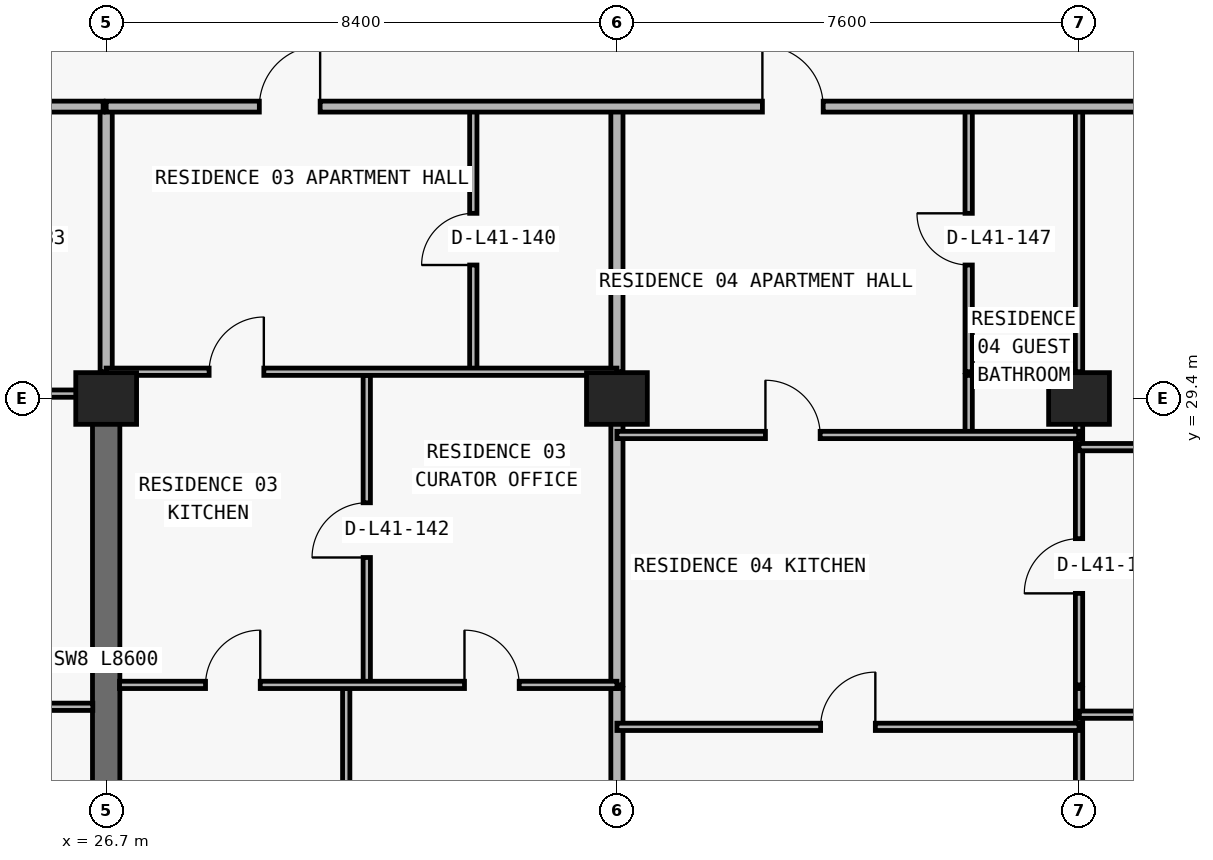
"""IFC4 building model, lengths in metres.
Left out: names, types, materials, properties, quantities, classifications, styles, units other than length and angle.
Written with IfcOpenShell. Run it as: python <this file> out.ifc"""

import sys

from ifc_helpers import new_model, si_unit, direction, frame, frame_2d, origin, origin_2d, place, context, subcontext, project, spatial, rectangle, extrude, element, fill, save


model = new_model("IFC4")
c1 = context("Model", 3, precision=1e-05, world=origin(), true_north=direction((0.0, 1.0)))
c2 = subcontext(c1, "Body", "Model", "MODEL_VIEW")
j1 = project(units=[si_unit("LENGTHUNIT", "METRE"), si_unit("PLANEANGLEUNIT", "RADIAN")], contexts=[c1])
p1 = place(None, origin())
s1 = spatial("IfcSite", under=j1, at=p1, CompositionType="ELEMENT")
p2 = place(p1, origin())
s2 = spatial("IfcBuilding", under=s1, at=p2, CompositionType="ELEMENT")
p3 = place(p2, frame((0.0, 0.0, 148.8)))
s3 = spatial("IfcBuildingStorey", under=s2, at=p3, CompositionType="ELEMENT", Elevation=148.8)
for number, where, z_axis, x_axis in (
    (1, (26.7, 29.4, 0.0), (0.0, 0.0, 1.0), (1.0, 0.0, 0.0)),
    (2, (35.1, 29.4, 0.0), (0.0, 0.0, 1.0), (1.0, 0.0, 0.0)),
    (3, (42.7, 29.4, 0.0), (0.0, 0.0, 1.0), (1.0, 0.0, 0.0)),
):
    element("IfcColumn", number, at=place(p3, frame(where, z_axis=z_axis, x_axis=x_axis)), inside=s3, PredefinedType="COLUMN", context=c2, shape_type="SweptSolid", body=[
        extrude(rectangle(XDim=1.0, YDim=0.85, at=origin_2d()), origin(), (0.0, 0.0, 1.0), 3.0),
    ])
p4 = place(p3, frame((26.7, 20.8, 0.0), z_axis=(0.0, 0.0, 1.0), x_axis=(0.0, 1.0, 0.0)))
e4 = element("IfcWall", 4, at=p4, inside=s3, PredefinedType="SHEAR", context=c2, shape_type="SweptSolid", body=[
    extrude(rectangle(XDim=8.6, YDim=0.45, at=frame_2d((4.3, 0.0))), origin(), (0.0, 0.0, 1.0), 3.0),
])
p5 = place(p3, frame((26.7, 29.405, 0.0), z_axis=(0.0, 0.0, 1.0), x_axis=(0.0, 1.0, 0.0)))
e5 = element("IfcWall", 5, at=p5, inside=s3, PredefinedType="PARTITIONING", context=c2, shape_type="SweptSolid", body=[
    extrude(rectangle(XDim=0.375, YDim=0.2, at=frame_2d((0.188, 0.0))), origin(), (0.0, 0.0, 1.0), 3.0),
])
p6 = place(p3, frame((26.7, 29.84, 0.0), z_axis=(0.0, 0.0, 1.0), x_axis=(0.0, 1.0, 0.0)))
e6 = element("IfcWall", 6, at=p6, inside=s3, PredefinedType="PARTITIONING", context=c2, shape_type="SweptSolid", body=[
    extrude(rectangle(XDim=4.36, YDim=0.2, at=frame_2d((2.18, 0.0))), origin(), (0.0, 0.0, 1.0), 2.285),
])
p7 = place(p3, frame((30.648, 8.84, 0.0), z_axis=(0.0, 0.0, 1.0), x_axis=(0.0, 1.0, 0.0)))
e7 = element("IfcWall", 7, at=p7, inside=s3, PredefinedType="PARTITIONING", context=c2, shape_type="SweptSolid", body=[
    extrude(rectangle(XDim=15.79, YDim=0.12, at=frame_2d((7.895, 0.0))), origin(), (0.0, 0.0, 1.0), 3.0),
])
p8 = place(p3, frame((30.986, 24.69, 0.0), z_axis=(0.0, 0.0, 1.0), x_axis=(0.0, 1.0, 0.0)))
e8 = element("IfcWall", 8, at=p8, inside=s3, PredefinedType="PARTITIONING", context=c2, shape_type="SweptSolid", body=[
    extrude(rectangle(XDim=5.09, YDim=0.12, at=frame_2d((2.545, 0.0))), origin(), (0.0, 0.0, 1.0), 2.436),
])
p9 = place(p8, frame((2.095, 0.0, 0.0)))
e9 = element("IfcOpeningElement", 9, at=p9, cuts=e8, PredefinedType="OPENING", context=c2, shape_type="SweptSolid", body=[
    extrude(rectangle(XDim=0.9, YDim=2.15, at=frame_2d((0.45, 1.075))), frame((0.0, 0.07, 0.0), z_axis=(0.0, -1.0, 0.0), x_axis=(1.0, 0.0, 0.0)), (0.0, 0.0, 1.0), 0.14),
])
p10 = place(p3, frame((32.738, 29.84, 0.0), z_axis=(0.0, 0.0, 1.0), x_axis=(0.0, 1.0, 0.0)))
e10 = element("IfcWall", 10, at=p10, inside=s3, PredefinedType="PARTITIONING", context=c2, shape_type="SweptSolid", body=[
    extrude(rectangle(XDim=4.36, YDim=0.12, at=frame_2d((2.18, 0.0))), origin(), (0.0, 0.0, 1.0), 3.0),
])
p11 = place(p10, frame((1.755, 0.0, 0.0)))
e11 = element("IfcOpeningElement", 11, at=p11, cuts=e10, PredefinedType="OPENING", context=c2, shape_type="SweptSolid", body=[
    extrude(rectangle(XDim=0.85, YDim=2.1, at=frame_2d((0.425, 1.05))), frame((0.0, 0.07, 0.0), z_axis=(0.0, -1.0, 0.0), x_axis=(1.0, 0.0, 0.0)), (0.0, 0.0, 1.0), 0.14),
])
p12 = place(p3, frame((35.1, 8.84, 0.0), z_axis=(0.0, 0.0, 1.0), x_axis=(0.0, 1.0, 0.0)))
e12 = element("IfcWall", 12, at=p12, inside=s3, PredefinedType="PARTITIONING", context=c2, shape_type="SweptSolid", body=[
    extrude(rectangle(XDim=15.79, YDim=0.2, at=frame_2d((7.895, 0.0))), origin(), (0.0, 0.0, 1.0), 2.124),
])
p13 = place(p3, frame((35.1, 24.69, 0.0), z_axis=(0.0, 0.0, 1.0), x_axis=(0.0, 1.0, 0.0)))
e13 = element("IfcWall", 13, at=p13, inside=s3, PredefinedType="PARTITIONING", context=c2, shape_type="SweptSolid", body=[
    extrude(rectangle(XDim=5.09, YDim=0.2, at=frame_2d((2.545, 0.0))), origin(), (0.0, 0.0, 1.0), 2.124),
])
p14 = place(p3, frame((35.1, 29.84, 0.0), z_axis=(0.0, 0.0, 1.0), x_axis=(0.0, 1.0, 0.0)))
e14 = element("IfcWall", 14, at=p14, inside=s3, PredefinedType="PARTITIONING", context=c2, shape_type="SweptSolid", body=[
    extrude(rectangle(XDim=4.36, YDim=0.2, at=frame_2d((2.18, 0.0))), origin(), (0.0, 0.0, 1.0), 2.124),
])
p15 = place(p3, frame((40.885, 28.8, 0.0), z_axis=(0.0, 0.0, 1.0), x_axis=(0.0, 1.0, 0.0)))
e15 = element("IfcWall", 15, at=p15, inside=s3, PredefinedType="PARTITIONING", context=c2, shape_type="SweptSolid", body=[
    extrude(rectangle(XDim=0.98, YDim=0.12, at=frame_2d((0.49, 0.0))), origin(), (0.0, 0.0, 1.0), 2.629),
])
p16 = place(p3, frame((40.885, 29.84, 0.0), z_axis=(0.0, 0.0, 1.0), x_axis=(0.0, 1.0, 0.0)))
e16 = element("IfcWall", 16, at=p16, inside=s3, PredefinedType="PARTITIONING", context=c2, shape_type="SweptSolid", body=[
    extrude(rectangle(XDim=4.36, YDim=0.12, at=frame_2d((2.18, 0.0))), origin(), (0.0, 0.0, 1.0), 3.0),
])
p17 = place(p16, frame((1.755, 0.0, 0.0)))
e17 = element("IfcOpeningElement", 17, at=p17, cuts=e16, PredefinedType="OPENING", context=c2, shape_type="SweptSolid", body=[
    extrude(rectangle(XDim=0.85, YDim=2.1, at=frame_2d((0.425, 1.05))), frame((0.0, 0.07, 0.0), z_axis=(0.0, -1.0, 0.0), x_axis=(1.0, 0.0, 0.0)), (0.0, 0.0, 1.0), 0.14),
])
p18 = place(p3, frame((42.7, 8.84, 0.0), z_axis=(0.0, 0.0, 1.0), x_axis=(0.0, 1.0, 0.0)))
e18 = element("IfcWall", 18, at=p18, inside=s3, PredefinedType="PARTITIONING", context=c2, shape_type="SweptSolid", body=[
    extrude(rectangle(XDim=15.79, YDim=0.12, at=frame_2d((7.895, 0.0))), origin(), (0.0, 0.0, 1.0), 2.124),
])
p19 = place(p3, frame((42.7, 24.69, 0.0), z_axis=(0.0, 0.0, 1.0), x_axis=(0.0, 1.0, 0.0)))
e19 = element("IfcWall", 19, at=p19, inside=s3, PredefinedType="PARTITIONING", context=c2, shape_type="SweptSolid", body=[
    extrude(rectangle(XDim=5.09, YDim=0.12, at=frame_2d((2.545, 0.0))), origin(), (0.0, 0.0, 1.0), 2.124),
])
p20 = place(p19, frame((1.505, 0.0, 0.0)))
e20 = element("IfcOpeningElement", 20, at=p20, cuts=e19, PredefinedType="OPENING", context=c2, shape_type="SweptSolid", body=[
    extrude(rectangle(XDim=0.9, YDim=2.074, at=frame_2d((0.45, 1.037))), frame((0.0, 0.07, 0.0), z_axis=(0.0, -1.0, 0.0), x_axis=(1.0, 0.0, 0.0)), (0.0, 0.0, 1.0), 0.14),
])
p21 = place(p3, frame((42.7, 29.84, 0.0), z_axis=(0.0, 0.0, 1.0), x_axis=(0.0, 1.0, 0.0)))
e21 = element("IfcWall", 21, at=p21, inside=s3, PredefinedType="PARTITIONING", context=c2, shape_type="SweptSolid", body=[
    extrude(rectangle(XDim=4.36, YDim=0.12, at=frame_2d((2.18, 0.0))), origin(), (0.0, 0.0, 1.0), 2.124),
])
p22 = place(p3, frame((35.1, 24.0, 0.0), z_axis=(0.0, 0.0, 1.0), x_axis=(1.0, 0.0, 0.0)))
e22 = element("IfcWall", 22, at=p22, inside=s3, PredefinedType="PARTITIONING", context=c2, shape_type="SweptSolid", body=[
    extrude(rectangle(XDim=7.6, YDim=0.12, at=frame_2d((3.8, 0.0))), origin(), (0.0, 0.0, 1.0), 3.0),
])
p23 = place(p22, frame((3.35, 0.0, 0.0)))
e23 = element("IfcOpeningElement", 23, at=p23, cuts=e22, PredefinedType="OPENING", context=c2, shape_type="SweptSolid", body=[
    extrude(rectangle(XDim=0.9, YDim=2.15, at=frame_2d((0.45, 1.075))), frame((0.0, 0.07, 0.0), z_axis=(0.0, -1.0, 0.0), x_axis=(1.0, 0.0, 0.0)), (0.0, 0.0, 1.0), 0.14),
])
p24 = place(p3, frame((42.705, 24.2, 0.0), z_axis=(0.0, 0.0, 1.0), x_axis=(1.0, 0.0, 0.0)))
e24 = element("IfcWall", 24, at=p24, inside=s3, PredefinedType="PARTITIONING", context=c2, shape_type="SweptSolid", body=[
    extrude(rectangle(XDim=8.175, YDim=0.12, at=frame_2d((4.087, 0.0))), origin(), (0.0, 0.0, 1.0), 3.0),
])
p25 = place(p24, frame((3.637, 0.0, 0.0)))
e25 = element("IfcOpeningElement", 25, at=p25, cuts=e24, PredefinedType="OPENING", context=c2, shape_type="SweptSolid", body=[
    extrude(rectangle(XDim=0.9, YDim=2.15, at=frame_2d((0.45, 1.075))), frame((0.0, 0.07, 0.0), z_axis=(0.0, -1.0, 0.0), x_axis=(1.0, 0.0, 0.0)), (0.0, 0.0, 1.0), 0.14),
])
p26 = place(p3, frame((18.3, 24.33, 0.0), z_axis=(0.0, 0.0, 1.0), x_axis=(1.0, 0.0, 0.0)))
e26 = element("IfcWall", 26, at=p26, inside=s3, PredefinedType="PARTITIONING", context=c2, shape_type="SweptSolid", body=[
    extrude(rectangle(XDim=8.18, YDim=0.12, at=frame_2d((4.09, 0.0))), origin(), (0.0, 0.0, 1.0), 3.0),
])
p27 = place(p26, frame((1.86, 0.0, 0.0)))
e27 = element("IfcOpeningElement", 27, at=p27, cuts=e26, PredefinedType="OPENING", context=c2, shape_type="SweptSolid", body=[
    extrude(rectangle(XDim=0.9, YDim=2.15, at=frame_2d((0.45, 1.075))), frame((0.0, 0.07, 0.0), z_axis=(0.0, -1.0, 0.0), x_axis=(1.0, 0.0, 0.0)), (0.0, 0.0, 1.0), 0.14),
])
p28 = place(p26, frame((6.033, 0.0, 0.0)))
e28 = element("IfcOpeningElement", 28, at=p28, cuts=e26, PredefinedType="OPENING", context=c2, shape_type="SweptSolid", body=[
    extrude(rectangle(XDim=0.9, YDim=2.15, at=frame_2d((0.45, 1.075))), frame((0.0, 0.07, 0.0), z_axis=(0.0, -1.0, 0.0), x_axis=(1.0, 0.0, 0.0)), (0.0, 0.0, 1.0), 0.14),
])
p29 = place(p3, frame((26.92, 24.69, 0.0), z_axis=(0.0, 0.0, 1.0), x_axis=(1.0, 0.0, 0.0)))
e29 = element("IfcWall", 29, at=p29, inside=s3, PredefinedType="PARTITIONING", context=c2, shape_type="SweptSolid", body=[
    extrude(rectangle(XDim=8.18, YDim=0.12, at=frame_2d((4.09, 0.0))), origin(), (0.0, 0.0, 1.0), 3.0),
])
p30 = place(p29, frame((1.414, 0.0, 0.0)))
e30 = element("IfcOpeningElement", 30, at=p30, cuts=e29, PredefinedType="OPENING", context=c2, shape_type="SweptSolid", body=[
    extrude(rectangle(XDim=0.9, YDim=2.15, at=frame_2d((0.45, 1.075))), frame((0.0, 0.07, 0.0), z_axis=(0.0, -1.0, 0.0), x_axis=(1.0, 0.0, 0.0)), (0.0, 0.0, 1.0), 0.14),
])
p31 = place(p29, frame((5.673, 0.0, 0.0)))
e31 = element("IfcOpeningElement", 31, at=p31, cuts=e29, PredefinedType="OPENING", context=c2, shape_type="SweptSolid", body=[
    extrude(rectangle(XDim=0.9, YDim=2.15, at=frame_2d((0.45, 1.075))), frame((0.0, 0.07, 0.0), z_axis=(0.0, -1.0, 0.0), x_axis=(1.0, 0.0, 0.0)), (0.0, 0.0, 1.0), 0.14),
])
p32 = place(p3, frame((42.7, 28.6, 0.0), z_axis=(0.0, 0.0, 1.0), x_axis=(1.0, 0.0, 0.0)))
e32 = element("IfcWall", 32, at=p32, inside=s3, PredefinedType="PARTITIONING", context=c2, shape_type="SweptSolid", body=[
    extrude(rectangle(XDim=8.18, YDim=0.12, at=frame_2d((4.09, 0.0))), origin(), (0.0, 0.0, 1.0), 3.0),
])
p33 = place(p32, frame((2.848, 0.0, 0.0)))
e33 = element("IfcOpeningElement", 33, at=p33, cuts=e32, PredefinedType="OPENING", context=c2, shape_type="SweptSolid", body=[
    extrude(rectangle(XDim=0.9, YDim=2.15, at=frame_2d((0.45, 1.075))), frame((0.0, 0.07, 0.0), z_axis=(0.0, -1.0, 0.0), x_axis=(1.0, 0.0, 0.0)), (0.0, 0.0, 1.0), 0.14),
])
p34 = place(p3, frame((35.1, 28.8, 0.0), z_axis=(0.0, 0.0, 1.0), x_axis=(1.0, 0.0, 0.0)))
e34 = element("IfcWall", 34, at=p34, inside=s3, PredefinedType="PARTITIONING", context=c2, shape_type="SweptSolid", body=[
    extrude(rectangle(XDim=7.595, YDim=0.12, at=frame_2d((3.797, 0.0))), origin(), (0.0, 0.0, 1.0), 3.0),
])
p35 = place(p34, frame((2.442, 0.0, 0.0)))
e35 = element("IfcOpeningElement", 35, at=p35, cuts=e34, PredefinedType="OPENING", context=c2, shape_type="SweptSolid", body=[
    extrude(rectangle(XDim=0.9, YDim=2.15, at=frame_2d((0.45, 1.075))), frame((0.0, 0.07, 0.0), z_axis=(0.0, -1.0, 0.0), x_axis=(1.0, 0.0, 0.0)), (0.0, 0.0, 1.0), 0.14),
])
p36 = place(p3, frame((18.3, 29.48, 0.0), z_axis=(0.0, 0.0, 1.0), x_axis=(1.0, 0.0, 0.0)))
e36 = element("IfcWall", 36, at=p36, inside=s3, PredefinedType="PARTITIONING", context=c2, shape_type="SweptSolid", body=[
    extrude(rectangle(XDim=8.18, YDim=0.12, at=frame_2d((4.09, 0.0))), origin(), (0.0, 0.0, 1.0), 2.124),
])
p37 = place(p36, frame((1.943, 0.0, 0.0)))
e37 = element("IfcOpeningElement", 37, at=p37, cuts=e36, PredefinedType="OPENING", context=c2, shape_type="SweptSolid", body=[
    extrude(rectangle(XDim=0.9, YDim=2.074, at=frame_2d((0.45, 1.037))), frame((0.0, 0.07, 0.0), z_axis=(0.0, -1.0, 0.0), x_axis=(1.0, 0.0, 0.0)), (0.0, 0.0, 1.0), 0.14),
])
p38 = place(p3, frame((26.7, 29.84, 0.0), z_axis=(0.0, 0.0, 1.0), x_axis=(1.0, 0.0, 0.0)))
e38 = element("IfcWall", 38, at=p38, inside=s3, PredefinedType="PARTITIONING", context=c2, shape_type="SweptSolid", body=[
    extrude(rectangle(XDim=8.4, YDim=0.12, at=frame_2d((4.2, 0.0))), origin(), (0.0, 0.0, 1.0), 3.0),
])
p39 = place(p38, frame((1.693, 0.0, 0.0)))
e39 = element("IfcOpeningElement", 39, at=p39, cuts=e38, PredefinedType="OPENING", context=c2, shape_type="SweptSolid", body=[
    extrude(rectangle(XDim=0.9, YDim=2.15, at=frame_2d((0.45, 1.075))), frame((0.0, 0.07, 0.0), z_axis=(0.0, -1.0, 0.0), x_axis=(1.0, 0.0, 0.0)), (0.0, 0.0, 1.0), 0.14),
])
p40 = place(p3, frame((18.3, 34.2, 0.0), z_axis=(0.0, 0.0, 1.0), x_axis=(1.0, 0.0, 0.0)))
e40 = element("IfcWall", 40, at=p40, inside=s3, PredefinedType="PARTITIONING", context=c2, shape_type="SweptSolid", body=[
    extrude(rectangle(XDim=8.35, YDim=0.18, at=frame_2d((4.175, 0.0))), origin(), (0.0, 0.0, 1.0), 3.0),
])
p41 = place(p40, frame((2.683, 0.0, 0.0)))
e41 = element("IfcOpeningElement", 41, at=p41, cuts=e40, PredefinedType="OPENING", context=c2, shape_type="SweptSolid", body=[
    extrude(rectangle(XDim=1.0, YDim=2.2, at=frame_2d((0.5, 1.1))), frame((0.0, 0.1, 0.0), z_axis=(0.0, -1.0, 0.0), x_axis=(1.0, 0.0, 0.0)), (0.0, 0.0, 1.0), 0.2),
])
p42 = place(p3, frame((26.7, 34.2, 0.0), z_axis=(0.0, 0.0, 1.0), x_axis=(1.0, 0.0, 0.0)))
e42 = element("IfcWall", 42, at=p42, inside=s3, PredefinedType="PARTITIONING", context=c2, shape_type="SweptSolid", body=[
    extrude(rectangle(XDim=32.8, YDim=0.18, at=frame_2d((16.4, 0.0))), origin(), (0.0, 0.0, 1.0), 3.0),
])
p43 = place(p42, frame((2.519, 0.0, 0.0)))
e43 = element("IfcOpeningElement", 43, at=p43, cuts=e42, PredefinedType="OPENING", context=c2, shape_type="SweptSolid", body=[
    extrude(rectangle(XDim=1.0, YDim=2.2, at=frame_2d((0.5, 1.1))), frame((0.0, 0.1, 0.0), z_axis=(0.0, -1.0, 0.0), x_axis=(1.0, 0.0, 0.0)), (0.0, 0.0, 1.0), 0.2),
])
p44 = place(p42, frame((10.792, 0.0, 0.0)))
e44 = element("IfcOpeningElement", 44, at=p44, cuts=e42, PredefinedType="OPENING", context=c2, shape_type="SweptSolid", body=[
    extrude(rectangle(XDim=1.0, YDim=2.2, at=frame_2d((0.5, 1.1))), frame((0.0, 0.1, 0.0), z_axis=(0.0, -1.0, 0.0), x_axis=(1.0, 0.0, 0.0)), (0.0, 0.0, 1.0), 0.2),
])
p45 = place(p42, frame((27.146, 0.0, 0.0)))
e45 = element("IfcOpeningElement", 45, at=p45, cuts=e42, PredefinedType="OPENING", context=c2, shape_type="SweptSolid", body=[
    extrude(rectangle(XDim=1.0, YDim=2.2, at=frame_2d((0.5, 1.1))), frame((0.0, 0.1, 0.0), z_axis=(0.0, -1.0, 0.0), x_axis=(1.0, 0.0, 0.0)), (0.0, 0.0, 1.0), 0.2),
])
p46 = place(p43, origin())
e46 = element("IfcDoor", 46, at=p46, inside=s3, OperationType="SINGLE_SWING_RIGHT", PredefinedType="DOOR", context=c2, shape_type="SweptSolid", body=[
    extrude(rectangle(XDim=1.0, YDim=2.2, at=frame_2d((0.5, 1.1))), frame((0.0, 0.025, 0.0), z_axis=(0.0, -1.0, 0.0), x_axis=(1.0, 0.0, 0.0)), (0.0, 0.0, 1.0), 0.05),
])
fill(e43, e46)
p47 = place(p11, origin())
e47 = element("IfcDoor", 47, at=p47, inside=s3, OperationType="SINGLE_SWING_LEFT", PredefinedType="DOOR", context=c2, shape_type="SweptSolid", body=[
    extrude(rectangle(XDim=0.85, YDim=2.1, at=frame_2d((0.425, 1.05))), frame((0.0, 0.025, 0.0), z_axis=(0.0, -1.0, 0.0), x_axis=(1.0, 0.0, 0.0)), (0.0, 0.0, 1.0), 0.05),
])
fill(e11, e47)
p48 = place(p39, origin())
e48 = element("IfcDoor", 48, at=p48, inside=s3, OperationType="SINGLE_SWING_RIGHT", PredefinedType="DOOR", context=c2, shape_type="SweptSolid", body=[
    extrude(rectangle(XDim=0.9, YDim=2.15, at=frame_2d((0.45, 1.075))), frame((0.0, 0.025, 0.0), z_axis=(0.0, -1.0, 0.0), x_axis=(1.0, 0.0, 0.0)), (0.0, 0.0, 1.0), 0.05),
])
fill(e39, e48)
p49 = place(p9, origin())
e49 = element("IfcDoor", 49, at=p49, inside=s3, OperationType="SINGLE_SWING_LEFT", PredefinedType="DOOR", context=c2, shape_type="SweptSolid", body=[
    extrude(rectangle(XDim=0.9, YDim=2.15, at=frame_2d((0.45, 1.075))), frame((0.0, 0.025, 0.0), z_axis=(0.0, -1.0, 0.0), x_axis=(1.0, 0.0, 0.0)), (0.0, 0.0, 1.0), 0.05),
])
fill(e9, e49)
p50 = place(p30, origin())
e50 = element("IfcDoor", 50, at=p50, inside=s3, OperationType="SINGLE_SWING_RIGHT", PredefinedType="DOOR", context=c2, shape_type="SweptSolid", body=[
    extrude(rectangle(XDim=0.9, YDim=2.15, at=frame_2d((0.45, 1.075))), frame((0.0, 0.025, 0.0), z_axis=(0.0, -1.0, 0.0), x_axis=(1.0, 0.0, 0.0)), (0.0, 0.0, 1.0), 0.05),
])
fill(e30, e50)
p51 = place(p31, origin())
e51 = element("IfcDoor", 51, at=p51, inside=s3, OperationType="SINGLE_SWING_LEFT", PredefinedType="DOOR", context=c2, shape_type="SweptSolid", body=[
    extrude(rectangle(XDim=0.9, YDim=2.15, at=frame_2d((0.45, 1.075))), frame((0.0, 0.025, 0.0), z_axis=(0.0, -1.0, 0.0), x_axis=(1.0, 0.0, 0.0)), (0.0, 0.0, 1.0), 0.05),
])
fill(e31, e51)
p52 = place(p44, origin())
e52 = element("IfcDoor", 52, at=p52, inside=s3, OperationType="SINGLE_SWING_LEFT", PredefinedType="DOOR", context=c2, shape_type="SweptSolid", body=[
    extrude(rectangle(XDim=1.0, YDim=2.2, at=frame_2d((0.5, 1.1))), frame((0.0, 0.025, 0.0), z_axis=(0.0, -1.0, 0.0), x_axis=(1.0, 0.0, 0.0)), (0.0, 0.0, 1.0), 0.05),
])
fill(e44, e52)
p53 = place(p17, origin())
e53 = element("IfcDoor", 53, at=p53, inside=s3, OperationType="SINGLE_SWING_RIGHT", PredefinedType="DOOR", context=c2, shape_type="SweptSolid", body=[
    extrude(rectangle(XDim=0.85, YDim=2.1, at=frame_2d((0.425, 1.05))), frame((0.0, 0.025, 0.0), z_axis=(0.0, -1.0, 0.0), x_axis=(1.0, 0.0, 0.0)), (0.0, 0.0, 1.0), 0.05),
])
fill(e17, e53)
p54 = place(p35, origin())
e54 = element("IfcDoor", 54, at=p54, inside=s3, OperationType="SINGLE_SWING_LEFT", PredefinedType="DOOR", context=c2, shape_type="SweptSolid", body=[
    extrude(rectangle(XDim=0.9, YDim=2.15, at=frame_2d((0.45, 1.075))), frame((0.0, 0.025, 0.0), z_axis=(0.0, -1.0, 0.0), x_axis=(1.0, 0.0, 0.0)), (0.0, 0.0, 1.0), 0.05),
])
fill(e35, e54)
p55 = place(p23, origin())
e55 = element("IfcDoor", 55, at=p55, inside=s3, OperationType="SINGLE_SWING_RIGHT", PredefinedType="DOOR", context=c2, shape_type="SweptSolid", body=[
    extrude(rectangle(XDim=0.9, YDim=2.15, at=frame_2d((0.45, 1.075))), frame((0.0, 0.025, 0.0), z_axis=(0.0, -1.0, 0.0), x_axis=(1.0, 0.0, 0.0)), (0.0, 0.0, 1.0), 0.05),
])
fill(e23, e55)
p56 = place(p20, origin())
e56 = element("IfcDoor", 56, at=p56, inside=s3, OperationType="SINGLE_SWING_LEFT", PredefinedType="DOOR", context=c2, shape_type="SweptSolid", body=[
    extrude(rectangle(XDim=0.9, YDim=2.074, at=frame_2d((0.45, 1.037))), frame((0.0, 0.025, 0.0), z_axis=(0.0, -1.0, 0.0), x_axis=(1.0, 0.0, 0.0)), (0.0, 0.0, 1.0), 0.05),
])
fill(e20, e56)
save(model, sys.argv[1])
